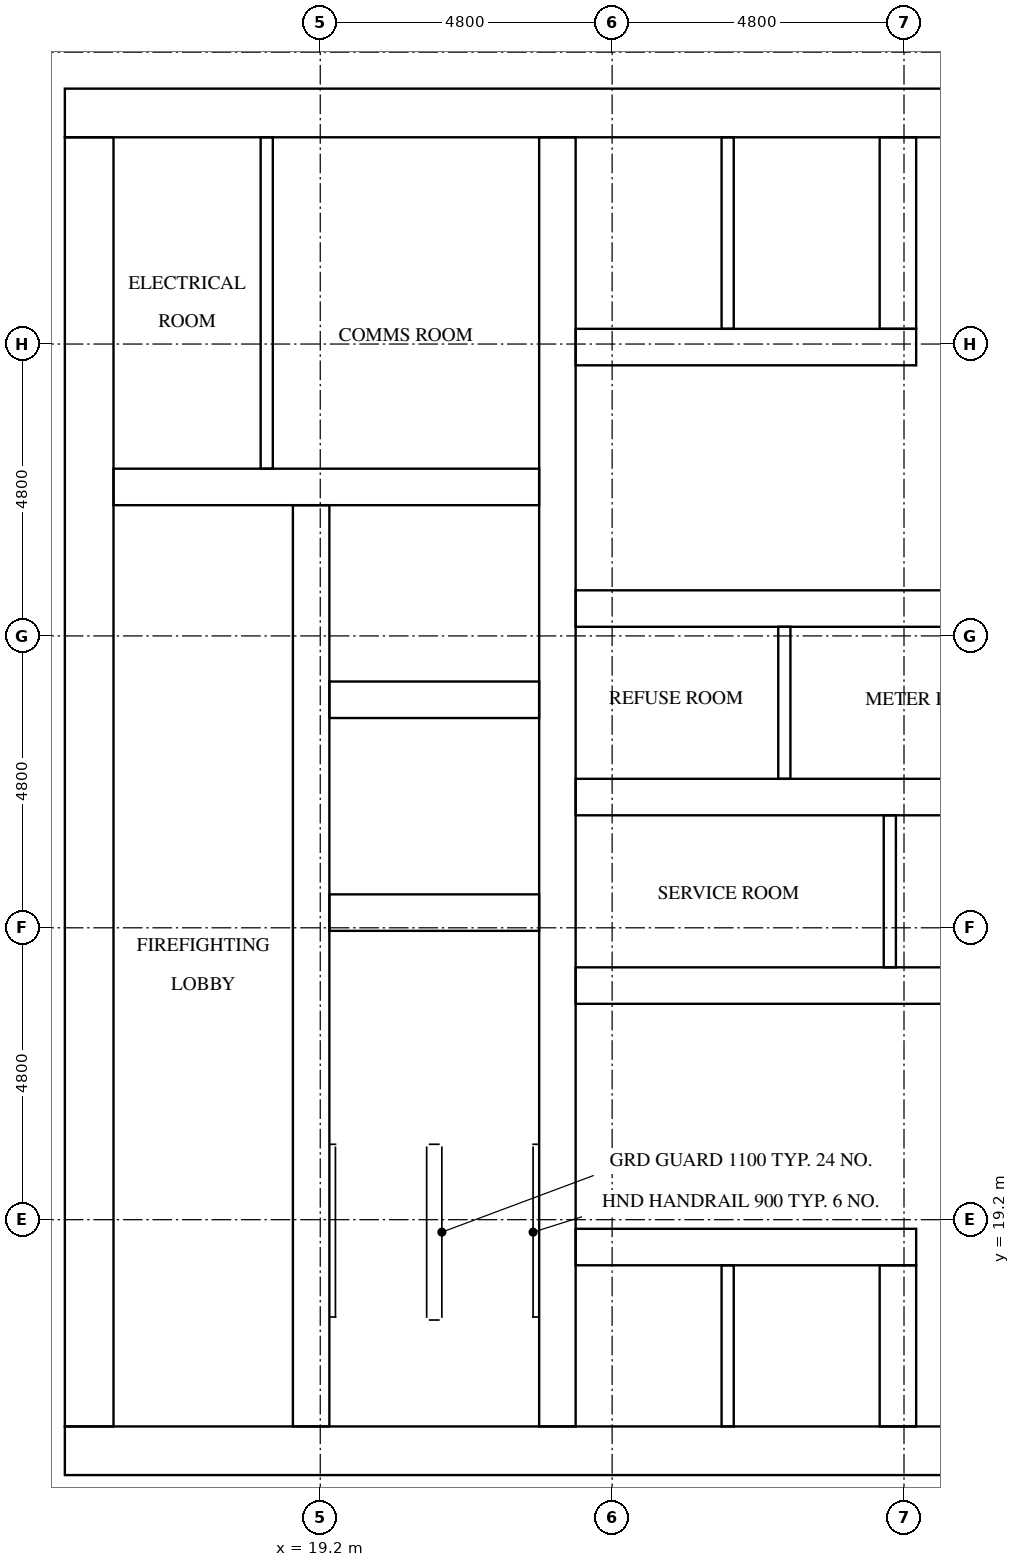
"""IFC4 building model, lengths in metres.
Left out: names, types, materials, properties, quantities, classifications, styles, units other than length and angle.
Written with IfcOpenShell. Run it as: python <this file> out.ifc"""

import sys

from ifc_helpers import new_model, si_unit, direction, frame, frame_2d, origin, place, context, subcontext, project, spatial, rectangle, extrude, element, fill, save


model = new_model("IFC4")
c1 = context("Model", 3, precision=1e-05, world=origin(), true_north=direction((0.0, 1.0)))
c2 = subcontext(c1, "Body", "Model", "MODEL_VIEW")
j1 = project(units=[si_unit("LENGTHUNIT", "METRE"), si_unit("PLANEANGLEUNIT", "RADIAN")], contexts=[c1])
p1 = place(None, origin())
s1 = spatial("IfcSite", under=j1, at=p1, CompositionType="ELEMENT")
p2 = place(p1, origin())
s2 = spatial("IfcBuilding", under=s1, at=p2, CompositionType="ELEMENT")
p3 = place(p2, frame((0.0, 0.0, 136.6)))
s3 = spatial("IfcBuildingStorey", under=s2, at=p3, CompositionType="ELEMENT", Elevation=136.6)
p4 = place(p3, frame((15.0, 15.4, 0.0), z_axis=(0.0, 0.0, 1.0), x_axis=(1.0, 0.0, 0.0)))
e1 = element("IfcWall", 1, at=p4, inside=s3, PredefinedType="SHEAR", context=c2, shape_type="SweptSolid", body=[
    extrude(rectangle(XDim=32.4, YDim=0.8, at=frame_2d((16.2, 0.0))), origin(), (0.0, 0.0, 1.0), 3.2),
])
p5 = place(p4, frame((15.3, 0.0, 0.0)))
e2 = element("IfcOpeningElement", 2, at=p5, cuts=e1, PredefinedType="OPENING", context=c2, shape_type="SweptSolid", body=[
    extrude(rectangle(XDim=1.8, YDim=2.1, at=frame_2d((0.9, 1.05))), frame((0.0, 0.41, 0.0), z_axis=(0.0, -1.0, 0.0), x_axis=(1.0, 0.0, 0.0)), (0.0, 0.0, 1.0), 0.82),
])
p6 = place(p3, frame((15.0, 37.4, 0.0), z_axis=(0.0, 0.0, 1.0), x_axis=(1.0, 0.0, 0.0)))
e3 = element("IfcWall", 3, at=p6, inside=s3, PredefinedType="SHEAR", context=c2, shape_type="SweptSolid", body=[
    extrude(rectangle(XDim=32.4, YDim=0.8, at=frame_2d((16.2, 0.0))), origin(), (0.0, 0.0, 1.0), 3.2),
])
p7 = place(p6, frame((15.3, 0.0, 0.0)))
e4 = element("IfcOpeningElement", 4, at=p7, cuts=e3, PredefinedType="OPENING", context=c2, shape_type="SweptSolid", body=[
    extrude(rectangle(XDim=1.8, YDim=2.1, at=frame_2d((0.9, 1.05))), frame((0.0, 0.41, 0.0), z_axis=(0.0, -1.0, 0.0), x_axis=(1.0, 0.0, 0.0)), (0.0, 0.0, 1.0), 0.82),
])
p8 = place(p6, frame((1.51, 0.0, 0.0)))
e5 = element("IfcOpeningElement", 5, at=p8, cuts=e3, PredefinedType="OPENING", context=c2, shape_type="SweptSolid", body=[
    extrude(rectangle(XDim=1.0, YDim=2.1, at=frame_2d((0.5, 1.05))), frame((0.0, 0.41, 0.0), z_axis=(0.0, -1.0, 0.0), x_axis=(1.0, 0.0, 0.0)), (0.0, 0.0, 1.0), 0.82),
])
p9 = place(p6, frame((5.11, 0.0, 0.0)))
e6 = element("IfcOpeningElement", 6, at=p9, cuts=e3, PredefinedType="OPENING", context=c2, shape_type="SweptSolid", body=[
    extrude(rectangle(XDim=1.0, YDim=2.1, at=frame_2d((0.5, 1.05))), frame((0.0, 0.41, 0.0), z_axis=(0.0, -1.0, 0.0), x_axis=(1.0, 0.0, 0.0)), (0.0, 0.0, 1.0), 0.82),
])
p10 = place(p3, frame((15.4, 15.8, 0.0), z_axis=(0.0, 0.0, 1.0), x_axis=(0.0, 1.0, 0.0)))
e7 = element("IfcWall", 7, at=p10, inside=s3, PredefinedType="SHEAR", context=c2, shape_type="SweptSolid", body=[
    extrude(rectangle(XDim=21.2, YDim=0.8, at=frame_2d((10.6, 0.0))), origin(), (0.0, 0.0, 1.0), 3.2),
])
p11 = place(p10, frame((4.96, 0.0, 0.0)))
e8 = element("IfcOpeningElement", 8, at=p11, cuts=e7, PredefinedType="OPENING", context=c2, shape_type="SweptSolid", body=[
    extrude(rectangle(XDim=1.2, YDim=2.1, at=frame_2d((0.6, 1.05))), frame((0.0, 0.41, 0.0), z_axis=(0.0, -1.0, 0.0), x_axis=(1.0, 0.0, 0.0)), (0.0, 0.0, 1.0), 0.82),
])
p12 = place(p3, frame((19.05, 15.8, 0.0), z_axis=(0.0, 0.0, 1.0), x_axis=(0.0, 1.0, 0.0)))
e9 = element("IfcWall", 9, at=p12, inside=s3, PredefinedType="SHEAR", context=c2, shape_type="SweptSolid", body=[
    extrude(rectangle(XDim=15.15, YDim=0.6, at=frame_2d((7.575, 0.0))), origin(), (0.0, 0.0, 1.0), 3.2),
])
p13 = place(p12, frame((9.65, 0.0, 0.0)))
e10 = element("IfcOpeningElement", 10, at=p13, cuts=e9, PredefinedType="OPENING", context=c2, shape_type="SweptSolid", body=[
    extrude(rectangle(XDim=1.1, YDim=2.1, at=frame_2d((0.55, 1.05))), frame((0.0, 0.31, 0.0), z_axis=(0.0, -1.0, 0.0), x_axis=(1.0, 0.0, 0.0)), (0.0, 0.0, 1.0), 0.62),
])
p14 = place(p12, frame((13.15, 0.0, 0.0)))
e11 = element("IfcOpeningElement", 11, at=p14, cuts=e9, PredefinedType="OPENING", context=c2, shape_type="SweptSolid", body=[
    extrude(rectangle(XDim=1.1, YDim=2.1, at=frame_2d((0.55, 1.05))), frame((0.0, 0.31, 0.0), z_axis=(0.0, -1.0, 0.0), x_axis=(1.0, 0.0, 0.0)), (0.0, 0.0, 1.0), 0.62),
])
p15 = place(p12, frame((0.4, 0.0, 0.0)))
e12 = element("IfcOpeningElement", 12, at=p15, cuts=e9, PredefinedType="OPENING", context=c2, shape_type="SweptSolid", body=[
    extrude(rectangle(XDim=1.2, YDim=2.1, at=frame_2d((0.6, 1.05))), frame((0.0, 0.31, 0.0), z_axis=(0.0, -1.0, 0.0), x_axis=(1.0, 0.0, 0.0)), (0.0, 0.0, 1.0), 0.62),
])
p16 = place(p3, frame((23.1, 15.8, 0.0), z_axis=(0.0, 0.0, 1.0), x_axis=(0.0, 1.0, 0.0)))
e13 = element("IfcWall", 13, at=p16, inside=s3, PredefinedType="SHEAR", context=c2, shape_type="SweptSolid", body=[
    extrude(rectangle(XDim=21.2, YDim=0.6, at=frame_2d((10.6, 0.0))), origin(), (0.0, 0.0, 1.0), 3.2),
])
for number, where, z_axis, x_axis in (
    (14, (19.35, 24.25, 0.0), (0.0, 0.0, 1.0), (1.0, 0.0, 0.0)),
    (15, (19.35, 27.75, 0.0), (0.0, 0.0, 1.0), (1.0, 0.0, 0.0)),
):
    element("IfcWall", number, at=place(p3, frame(where, z_axis=z_axis, x_axis=x_axis)), inside=s3, PredefinedType="SHEAR", context=c2, shape_type="SweptSolid", body=[
        extrude(rectangle(XDim=3.45, YDim=0.6, at=frame_2d((1.725, 0.0))), origin(), (0.0, 0.0, 1.0), 3.2),
    ])
p17 = place(p3, frame((15.8, 31.25, 0.0), z_axis=(0.0, 0.0, 1.0), x_axis=(1.0, 0.0, 0.0)))
e16 = element("IfcWall", 16, at=p17, inside=s3, PredefinedType="SHEAR", context=c2, shape_type="SweptSolid", body=[
    extrude(rectangle(XDim=7.0, YDim=0.6, at=frame_2d((3.5, 0.0))), origin(), (0.0, 0.0, 1.0), 3.2),
])
p18 = place(p3, frame((23.4, 18.75, 0.0), z_axis=(0.0, 0.0, 1.0), x_axis=(1.0, 0.0, 0.0)))
e17 = element("IfcWall", 17, at=p18, inside=s3, PredefinedType="SHEAR", context=c2, shape_type="SweptSolid", body=[
    extrude(rectangle(XDim=5.6, YDim=0.6, at=frame_2d((2.8, 0.0))), origin(), (0.0, 0.0, 1.0), 3.2),
])
p19 = place(p18, frame((0.65, 0.0, 0.0)))
e18 = element("IfcOpeningElement", 18, at=p19, cuts=e17, PredefinedType="OPENING", context=c2, shape_type="SweptSolid", body=[
    extrude(rectangle(XDim=1.1, YDim=2.1, at=frame_2d((0.55, 1.05))), frame((0.0, 0.31, 0.0), z_axis=(0.0, -1.0, 0.0), x_axis=(1.0, 0.0, 0.0)), (0.0, 0.0, 1.0), 0.62),
])
p20 = place(p18, frame((3.25, 0.0, 0.0)))
e19 = element("IfcOpeningElement", 19, at=p20, cuts=e17, PredefinedType="OPENING", context=c2, shape_type="SweptSolid", body=[
    extrude(rectangle(XDim=1.1, YDim=2.1, at=frame_2d((0.55, 1.05))), frame((0.0, 0.31, 0.0), z_axis=(0.0, -1.0, 0.0), x_axis=(1.0, 0.0, 0.0)), (0.0, 0.0, 1.0), 0.62),
])
p21 = place(p3, frame((23.4, 23.05, 0.0), z_axis=(0.0, 0.0, 1.0), x_axis=(1.0, 0.0, 0.0)))
e20 = element("IfcWall", 20, at=p21, inside=s3, PredefinedType="SHEAR", context=c2, shape_type="SweptSolid", body=[
    extrude(rectangle(XDim=15.6, YDim=0.6, at=frame_2d((7.8, 0.0))), origin(), (0.0, 0.0, 1.0), 3.2),
])
p22 = place(p21, frame((2.033, 0.0, 0.0)))
e21 = element("IfcOpeningElement", 21, at=p22, cuts=e20, PredefinedType="OPENING", context=c2, shape_type="SweptSolid", body=[
    extrude(rectangle(XDim=1.0, YDim=2.1, at=frame_2d((0.5, 1.05))), frame((0.0, 0.31, 0.0), z_axis=(0.0, -1.0, 0.0), x_axis=(1.0, 0.0, 0.0)), (0.0, 0.0, 1.0), 0.62),
])
p23 = place(p21, frame((11.706, 0.0, 0.0)))
e22 = element("IfcOpeningElement", 22, at=p23, cuts=e20, PredefinedType="OPENING", context=c2, shape_type="SweptSolid", body=[
    extrude(rectangle(XDim=1.0, YDim=2.1, at=frame_2d((0.5, 1.05))), frame((0.0, 0.31, 0.0), z_axis=(0.0, -1.0, 0.0), x_axis=(1.0, 0.0, 0.0)), (0.0, 0.0, 1.0), 0.62),
])
p24 = place(p21, frame((14.339, 0.0, 0.0)))
e23 = element("IfcOpeningElement", 23, at=p24, cuts=e20, PredefinedType="OPENING", context=c2, shape_type="SweptSolid", body=[
    extrude(rectangle(XDim=1.0, YDim=2.1, at=frame_2d((0.5, 1.05))), frame((0.0, 0.31, 0.0), z_axis=(0.0, -1.0, 0.0), x_axis=(1.0, 0.0, 0.0)), (0.0, 0.0, 1.0), 0.62),
])
p25 = place(p3, frame((23.4, 26.15, 0.0), z_axis=(0.0, 0.0, 1.0), x_axis=(1.0, 0.0, 0.0)))
e24 = element("IfcWall", 24, at=p25, inside=s3, PredefinedType="SHEAR", context=c2, shape_type="SweptSolid", body=[
    extrude(rectangle(XDim=15.6, YDim=0.6, at=frame_2d((7.8, 0.0))), origin(), (0.0, 0.0, 1.0), 3.2),
])
p26 = place(p3, frame((23.4, 29.25, 0.0), z_axis=(0.0, 0.0, 1.0), x_axis=(1.0, 0.0, 0.0)))
e25 = element("IfcWall", 25, at=p26, inside=s3, PredefinedType="SHEAR", context=c2, shape_type="SweptSolid", body=[
    extrude(rectangle(XDim=15.6, YDim=0.6, at=frame_2d((7.8, 0.0))), origin(), (0.0, 0.0, 1.0), 3.2),
])
p27 = place(p26, frame((1.166, 0.0, 0.0)))
e26 = element("IfcOpeningElement", 26, at=p27, cuts=e25, PredefinedType="OPENING", context=c2, shape_type="SweptSolid", body=[
    extrude(rectangle(XDim=1.0, YDim=2.1, at=frame_2d((0.5, 1.05))), frame((0.0, 0.31, 0.0), z_axis=(0.0, -1.0, 0.0), x_axis=(1.0, 0.0, 0.0)), (0.0, 0.0, 1.0), 0.62),
])
p28 = place(p26, frame((5.35, 0.0, 0.0)))
e27 = element("IfcOpeningElement", 27, at=p28, cuts=e25, PredefinedType="OPENING", context=c2, shape_type="SweptSolid", body=[
    extrude(rectangle(XDim=1.0, YDim=2.1, at=frame_2d((0.5, 1.05))), frame((0.0, 0.31, 0.0), z_axis=(0.0, -1.0, 0.0), x_axis=(1.0, 0.0, 0.0)), (0.0, 0.0, 1.0), 0.62),
])
p29 = place(p26, frame((9.016, 0.0, 0.0)))
e28 = element("IfcOpeningElement", 28, at=p29, cuts=e25, PredefinedType="OPENING", context=c2, shape_type="SweptSolid", body=[
    extrude(rectangle(XDim=1.0, YDim=2.1, at=frame_2d((0.5, 1.05))), frame((0.0, 0.31, 0.0), z_axis=(0.0, -1.0, 0.0), x_axis=(1.0, 0.0, 0.0)), (0.0, 0.0, 1.0), 0.62),
])
p30 = place(p26, frame((12.732, 0.0, 0.0)))
e29 = element("IfcOpeningElement", 29, at=p30, cuts=e25, PredefinedType="OPENING", context=c2, shape_type="SweptSolid", body=[
    extrude(rectangle(XDim=1.0, YDim=2.1, at=frame_2d((0.5, 1.05))), frame((0.0, 0.31, 0.0), z_axis=(0.0, -1.0, 0.0), x_axis=(1.0, 0.0, 0.0)), (0.0, 0.0, 1.0), 0.62),
])
p31 = place(p3, frame((23.4, 33.55, 0.0), z_axis=(0.0, 0.0, 1.0), x_axis=(1.0, 0.0, 0.0)))
e30 = element("IfcWall", 30, at=p31, inside=s3, PredefinedType="SHEAR", context=c2, shape_type="SweptSolid", body=[
    extrude(rectangle(XDim=5.6, YDim=0.6, at=frame_2d((2.8, 0.0))), origin(), (0.0, 0.0, 1.0), 3.2),
])
p32 = place(p3, frame((28.7, 15.8, 0.0), z_axis=(0.0, 0.0, 1.0), x_axis=(0.0, 1.0, 0.0)))
e31 = element("IfcWall", 31, at=p32, inside=s3, PredefinedType="SHEAR", context=c2, shape_type="SweptSolid", body=[
    extrude(rectangle(XDim=2.65, YDim=0.6, at=frame_2d((1.325, 0.0))), origin(), (0.0, 0.0, 1.0), 3.2),
])
p33 = place(p3, frame((28.7, 33.85, 0.0), z_axis=(0.0, 0.0, 1.0), x_axis=(0.0, 1.0, 0.0)))
e32 = element("IfcWall", 32, at=p33, inside=s3, PredefinedType="SHEAR", context=c2, shape_type="SweptSolid", body=[
    extrude(rectangle(XDim=3.15, YDim=0.6, at=frame_2d((1.575, 0.0))), origin(), (0.0, 0.0, 1.0), 3.2),
])
p34 = place(p3, frame((28.567, 23.35, 0.0), z_axis=(0.0, 0.0, 1.0), x_axis=(0.0, 1.0, 0.0)))
e33 = element("IfcWall", 33, at=p34, inside=s3, PredefinedType="SOLIDWALL", context=c2, shape_type="SweptSolid", body=[
    extrude(rectangle(XDim=2.5, YDim=0.2, at=frame_2d((1.25, 0.0))), origin(), (0.0, 0.0, 1.0), 3.2),
])
p35 = place(p3, frame((25.9, 15.8, 0.0), z_axis=(0.0, 0.0, 1.0), x_axis=(0.0, 1.0, 0.0)))
e34 = element("IfcWall", 34, at=p35, inside=s3, PredefinedType="SOLIDWALL", context=c2, shape_type="SweptSolid", body=[
    extrude(rectangle(XDim=2.65, YDim=0.2, at=frame_2d((1.325, 0.0))), origin(), (0.0, 0.0, 1.0), 3.2),
])
p36 = place(p3, frame((25.9, 33.85, 0.0), z_axis=(0.0, 0.0, 1.0), x_axis=(0.0, 1.0, 0.0)))
e35 = element("IfcWall", 35, at=p36, inside=s3, PredefinedType="SOLIDWALL", context=c2, shape_type="SweptSolid", body=[
    extrude(rectangle(XDim=3.15, YDim=0.2, at=frame_2d((1.575, 0.0))), origin(), (0.0, 0.0, 1.0), 3.2),
])
p37 = place(p3, frame((18.32, 31.55, 0.0), z_axis=(0.0, 0.0, 1.0), x_axis=(0.0, 1.0, 0.0)))
e36 = element("IfcWall", 36, at=p37, inside=s3, PredefinedType="PARTITIONING", context=c2, shape_type="SweptSolid", body=[
    extrude(rectangle(XDim=5.45, YDim=0.2, at=frame_2d((2.725, 0.0))), origin(), (0.0, 0.0, 1.0), 3.2),
])
p38 = place(p3, frame((26.832, 26.45, 0.0), z_axis=(0.0, 0.0, 1.0), x_axis=(0.0, 1.0, 0.0)))
e37 = element("IfcWall", 37, at=p38, inside=s3, PredefinedType="PARTITIONING", context=c2, shape_type="SweptSolid", body=[
    extrude(rectangle(XDim=2.5, YDim=0.2, at=frame_2d((1.25, 0.0))), origin(), (0.0, 0.0, 1.0), 3.2),
])
p39 = place(p19, origin())
e38 = element("IfcDoor", 38, at=p39, inside=s3, OperationType="DOUBLE_DOOR_SLIDING", PredefinedType="DOOR", context=c2, shape_type="SweptSolid", body=[
    extrude(rectangle(XDim=1.1, YDim=2.1, at=frame_2d((0.55, 1.05))), frame((0.0, 0.025, 0.0), z_axis=(0.0, -1.0, 0.0), x_axis=(1.0, 0.0, 0.0)), (0.0, 0.0, 1.0), 0.05),
])
fill(e18, e38)
p40 = place(p20, origin())
e39 = element("IfcDoor", 39, at=p40, inside=s3, OperationType="DOUBLE_DOOR_SLIDING", PredefinedType="DOOR", context=c2, shape_type="SweptSolid", body=[
    extrude(rectangle(XDim=1.1, YDim=2.1, at=frame_2d((0.55, 1.05))), frame((0.0, 0.025, 0.0), z_axis=(0.0, -1.0, 0.0), x_axis=(1.0, 0.0, 0.0)), (0.0, 0.0, 1.0), 0.05),
])
fill(e19, e39)
p41 = place(p13, origin())
e40 = element("IfcDoor", 40, at=p41, inside=s3, OperationType="DOUBLE_DOOR_SLIDING", PredefinedType="DOOR", context=c2, shape_type="SweptSolid", body=[
    extrude(rectangle(XDim=1.1, YDim=2.1, at=frame_2d((0.55, 1.05))), frame((0.0, 0.025, 0.0), z_axis=(0.0, -1.0, 0.0), x_axis=(1.0, 0.0, 0.0)), (0.0, 0.0, 1.0), 0.05),
])
fill(e10, e40)
p42 = place(p14, origin())
e41 = element("IfcDoor", 41, at=p42, inside=s3, OperationType="DOUBLE_DOOR_SLIDING", PredefinedType="DOOR", context=c2, shape_type="SweptSolid", body=[
    extrude(rectangle(XDim=1.1, YDim=2.1, at=frame_2d((0.55, 1.05))), frame((0.0, 0.025, 0.0), z_axis=(0.0, -1.0, 0.0), x_axis=(1.0, 0.0, 0.0)), (0.0, 0.0, 1.0), 0.05),
])
fill(e11, e41)
p43 = place(p15, frame((1.2, 0.0, 0.0), z_axis=(0.0, 0.0, 1.0), x_axis=(-1.0, 0.0, 0.0)))
e42 = element("IfcDoor", 42, at=p43, inside=s3, OperationType="SINGLE_SWING_LEFT", PredefinedType="DOOR", context=c2, shape_type="SweptSolid", body=[
    extrude(rectangle(XDim=1.2, YDim=2.1, at=frame_2d((0.6, 1.05))), frame((0.0, 0.025, 0.0), z_axis=(0.0, -1.0, 0.0), x_axis=(1.0, 0.0, 0.0)), (0.0, 0.0, 1.0), 0.05),
])
fill(e12, e42)
p44 = place(p11, frame((1.2, 0.0, 0.0), z_axis=(0.0, 0.0, 1.0), x_axis=(-1.0, 0.0, 0.0)))
e43 = element("IfcDoor", 43, at=p44, inside=s3, OperationType="SINGLE_SWING_RIGHT", PredefinedType="DOOR", context=c2, shape_type="SweptSolid", body=[
    extrude(rectangle(XDim=1.2, YDim=2.1, at=frame_2d((0.6, 1.05))), frame((0.0, 0.025, 0.0), z_axis=(0.0, -1.0, 0.0), x_axis=(1.0, 0.0, 0.0)), (0.0, 0.0, 1.0), 0.05),
])
fill(e8, e43)
p45 = place(p8, origin())
e44 = element("IfcDoor", 44, at=p45, inside=s3, OperationType="SINGLE_SWING_RIGHT", PredefinedType="DOOR", context=c2, shape_type="SweptSolid", body=[
    extrude(rectangle(XDim=1.0, YDim=2.1, at=frame_2d((0.5, 1.05))), frame((0.0, 0.025, 0.0), z_axis=(0.0, -1.0, 0.0), x_axis=(1.0, 0.0, 0.0)), (0.0, 0.0, 1.0), 0.05),
])
fill(e5, e44)
p46 = place(p9, origin())
e45 = element("IfcDoor", 45, at=p46, inside=s3, OperationType="SINGLE_SWING_LEFT", PredefinedType="DOOR", context=c2, shape_type="SweptSolid", body=[
    extrude(rectangle(XDim=1.0, YDim=2.1, at=frame_2d((0.5, 1.05))), frame((0.0, 0.025, 0.0), z_axis=(0.0, -1.0, 0.0), x_axis=(1.0, 0.0, 0.0)), (0.0, 0.0, 1.0), 0.05),
])
fill(e6, e45)
p47 = place(p22, frame((1.0, 0.0, 0.0), z_axis=(0.0, 0.0, 1.0), x_axis=(-1.0, 0.0, 0.0)))
e46 = element("IfcDoor", 46, at=p47, inside=s3, OperationType="SINGLE_SWING_RIGHT", PredefinedType="DOOR", context=c2, shape_type="SweptSolid", body=[
    extrude(rectangle(XDim=1.0, YDim=2.1, at=frame_2d((0.5, 1.05))), frame((0.0, 0.025, 0.0), z_axis=(0.0, -1.0, 0.0), x_axis=(1.0, 0.0, 0.0)), (0.0, 0.0, 1.0), 0.05),
])
fill(e21, e46)
p48 = place(p27, origin())
e47 = element("IfcDoor", 47, at=p48, inside=s3, OperationType="SINGLE_SWING_LEFT", PredefinedType="DOOR", context=c2, shape_type="SweptSolid", body=[
    extrude(rectangle(XDim=1.0, YDim=2.1, at=frame_2d((0.5, 1.05))), frame((0.0, 0.025, 0.0), z_axis=(0.0, -1.0, 0.0), x_axis=(1.0, 0.0, 0.0)), (0.0, 0.0, 1.0), 0.05),
])
fill(e26, e47)
p49 = place(p28, origin())
e48 = element("IfcDoor", 48, at=p49, inside=s3, OperationType="SINGLE_SWING_RIGHT", PredefinedType="DOOR", context=c2, shape_type="SweptSolid", body=[
    extrude(rectangle(XDim=1.0, YDim=2.1, at=frame_2d((0.5, 1.05))), frame((0.0, 0.025, 0.0), z_axis=(0.0, -1.0, 0.0), x_axis=(1.0, 0.0, 0.0)), (0.0, 0.0, 1.0), 0.05),
])
fill(e27, e48)
save(model, sys.argv[1])
